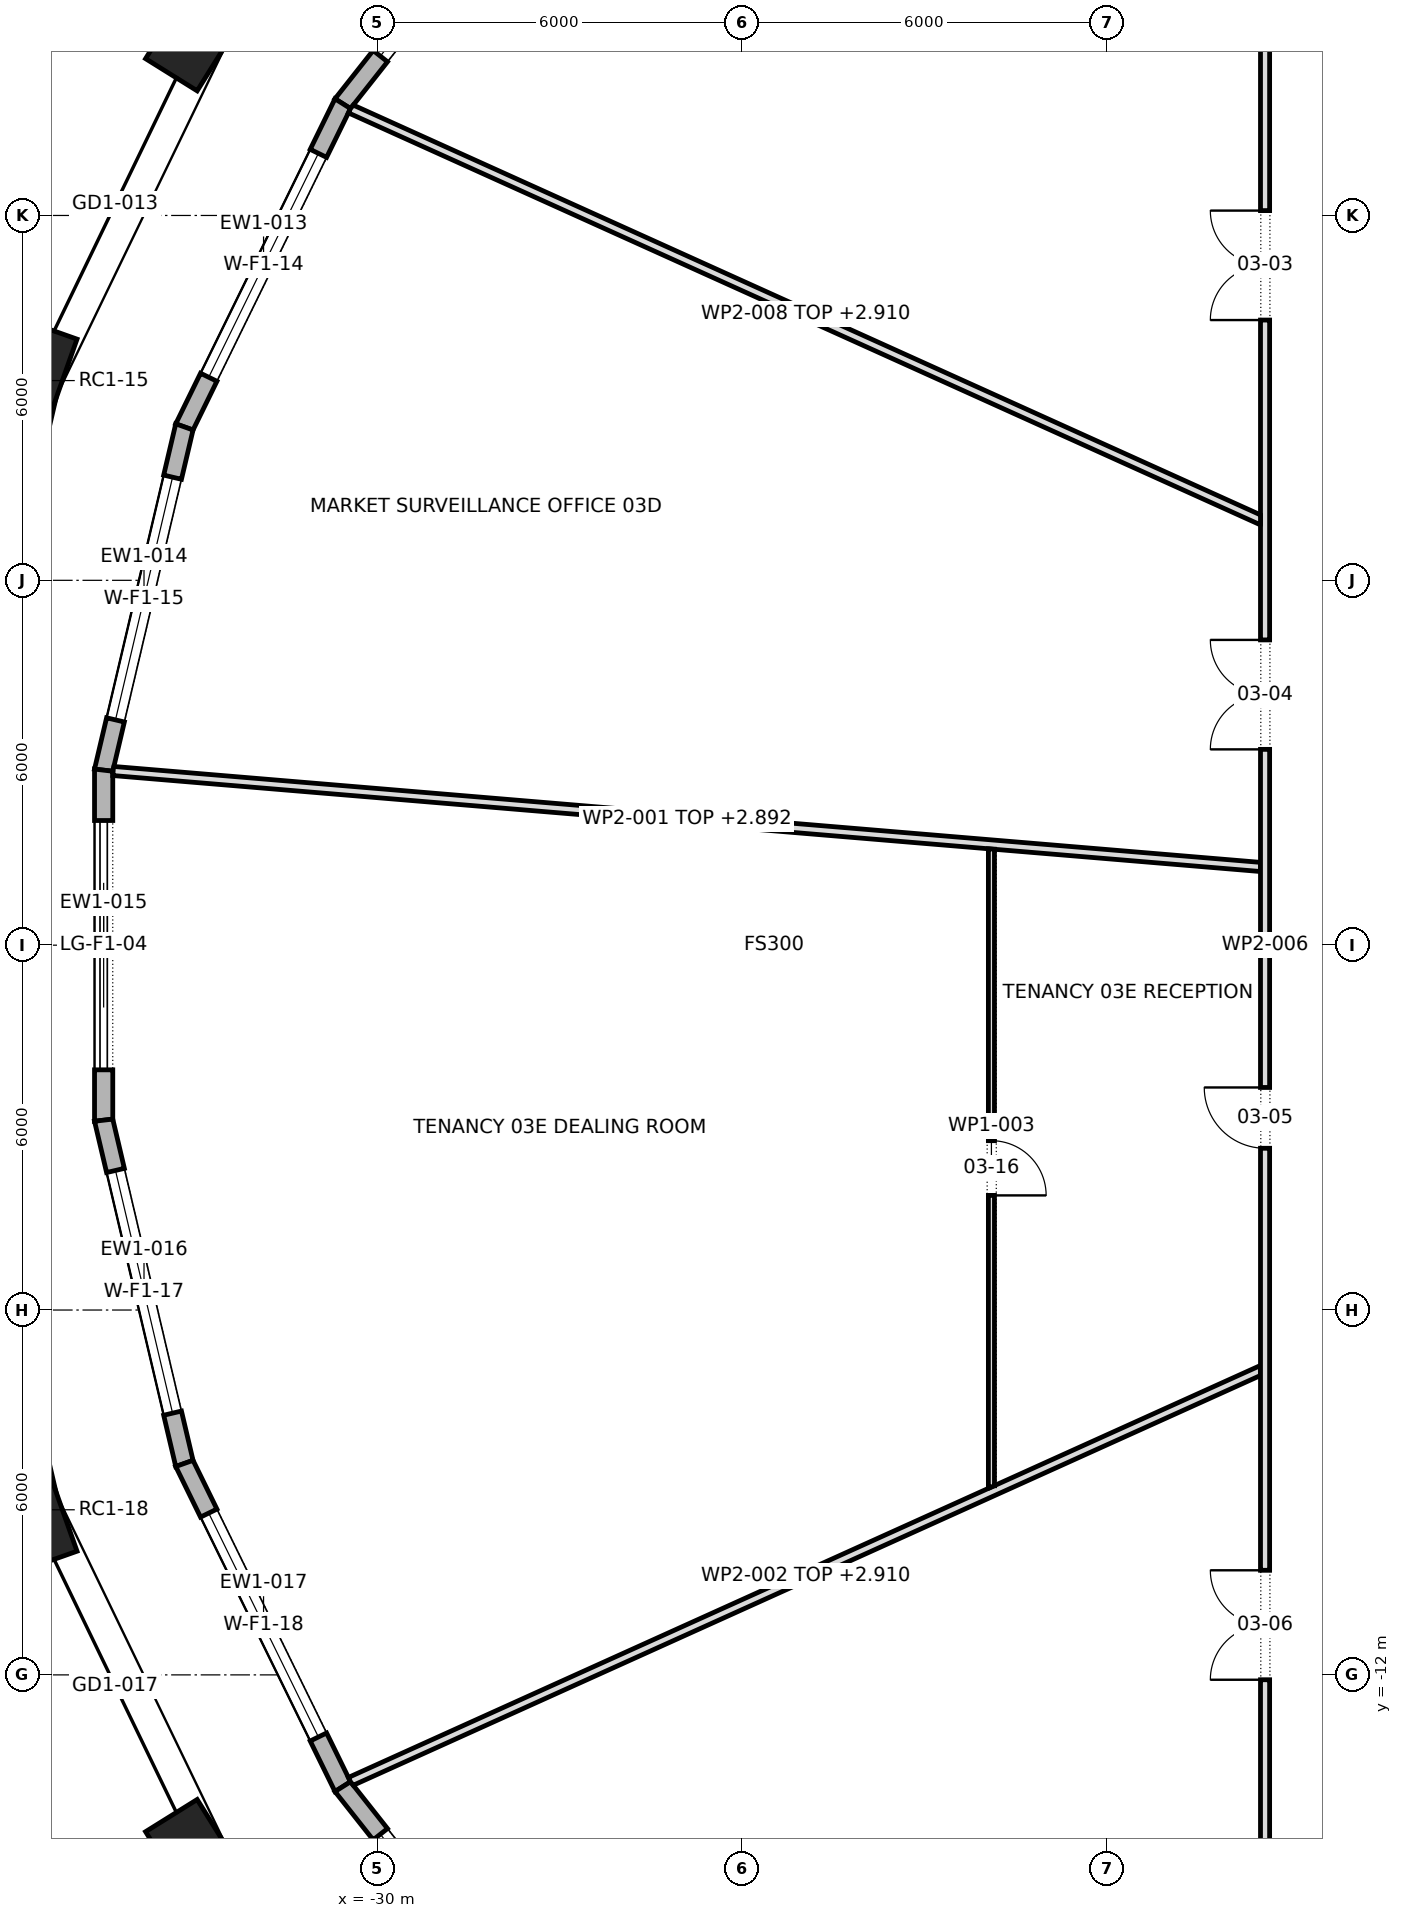
"""IFC4 building model, lengths in metres.
Left out: names, types, materials, properties, quantities, classifications, styles, units other than length and angle.
Written with IfcOpenShell. Run it as: python <this file> out.ifc"""

import sys

from ifc_helpers import new_model, si_unit, direction, frame, frame_2d, origin, origin_2d, place, context, subcontext, project, spatial, polyline, rectangle, outline, extrude, element, fill, save


model = new_model("IFC4")
c1 = context("Model", 3, precision=1e-05, world=origin(), true_north=direction((0.0, 1.0)))
c2 = subcontext(c1, "Body", "Model", "MODEL_VIEW")
j1 = project(units=[si_unit("LENGTHUNIT", "METRE"), si_unit("PLANEANGLEUNIT", "RADIAN")], contexts=[c1])
p1 = place(None, origin())
s1 = spatial("IfcSite", under=j1, at=p1, CompositionType="ELEMENT")
p2 = place(p1, origin())
s2 = spatial("IfcBuilding", under=s1, at=p2, CompositionType="ELEMENT")
p3 = place(p2, frame((0.0, 0.0, 48.7)))
s3 = spatial("IfcBuildingStorey", under=s2, at=p3, CompositionType="ELEMENT", Elevation=48.7)
for number, where, z_axis, x_axis in (
    (1, (-32.91, 15.078, 0.0), (0.0, 0.0, 1.0), (-0.529, -0.849, 0.0)),
    (2, (-35.709, 9.285, 0.0), (0.0, 0.0, 1.0), (-0.334, -0.943, 0.0)),
    (3, (-35.709, -9.285, 0.0), (0.0, 0.0, 1.0), (0.334, -0.943, 0.0)),
    (4, (-32.91, -15.078, 0.0), (0.0, 0.0, 1.0), (0.529, -0.849, 0.0)),
):
    element("IfcColumn", number, at=place(p3, frame(where, z_axis=z_axis, x_axis=x_axis)), inside=s3, PredefinedType="COLUMN", context=c2, shape_type="SweptSolid", body=[
        extrude(rectangle(XDim=1.8, YDim=1.0, at=origin_2d()), origin(), (0.0, 0.0, 1.0), 4.2),
    ])
p4 = place(p3, frame((-26.79, 18.62, 0.0), z_axis=(0.0, 0.0, 1.0), x_axis=(-0.619993638342, -0.78460683684, 0.0)))
e5 = element("IfcWall", 5, at=p4, inside=s3, PredefinedType="STANDARD", context=c2, shape_type="SweptSolid", body=[
    extrude(outline(polyline([(-0.015, -0.15), (6.11, -0.15), (6.078, 0.15), (0.015, 0.15), (-0.015, -0.15)])), origin(), (0.0, 0.0, 1.0), 3.9),
])
p5 = place(p4, frame((0.997, 0.0, 0.6)))
e6 = element("IfcOpeningElement", 6, at=p5, cuts=e5, PredefinedType="OPENING", context=c2, shape_type="SweptSolid", body=[
    extrude(rectangle(XDim=4.1, YDim=2.85, at=frame_2d((2.05, 1.425))), frame((0.0, 0.162, 0.0), z_axis=(0.0, -1.0, 0.0), x_axis=(1.0, 0.0, 0.0)), (0.0, 0.0, 1.0), 0.324),
])
p6 = place(p3, frame((-30.568, 13.838, 0.0), z_axis=(0.0, 0.0, 1.0), x_axis=(-0.439906146647, -0.898043752911, 0.0)))
e7 = element("IfcWall", 7, at=p6, inside=s3, PredefinedType="STANDARD", context=c2, shape_type="SweptSolid", body=[
    extrude(outline(polyline([(-0.016, -0.15), (5.936, -0.15), (5.902, 0.15), (0.016, 0.15), (-0.016, -0.15)])), origin(), (0.0, 0.0, 1.0), 3.9),
])
p7 = place(p6, frame((0.909, 0.0, 0.6)))
e8 = element("IfcOpeningElement", 8, at=p7, cuts=e7, PredefinedType="OPENING", context=c2, shape_type="SweptSolid", body=[
    extrude(rectangle(XDim=4.1, YDim=2.85, at=frame_2d((2.05, 1.425))), frame((0.0, 0.162, 0.0), z_axis=(0.0, -1.0, 0.0), x_axis=(1.0, 0.0, 0.0)), (0.0, 0.0, 1.0), 0.324),
])
p8 = place(p3, frame((-33.172, 8.523, 0.0), z_axis=(0.0, 0.0, 1.0), x_axis=(-0.228990053972, -0.973428762253, 0.0)))
e9 = element("IfcWall", 9, at=p8, inside=s3, PredefinedType="STANDARD", context=c2, shape_type="SweptSolid", body=[
    extrude(outline(polyline([(-0.017, -0.15), (5.816, -0.15), (5.781, 0.15), (0.017, 0.15), (-0.017, -0.15)])), origin(), (0.0, 0.0, 1.0), 3.9),
])
p9 = place(p8, frame((0.849, 0.0, 0.6)))
e10 = element("IfcOpeningElement", 10, at=p9, cuts=e9, PredefinedType="OPENING", context=c2, shape_type="SweptSolid", body=[
    extrude(rectangle(XDim=4.1, YDim=2.85, at=frame_2d((2.05, 1.425))), frame((0.0, 0.162, 0.0), z_axis=(0.0, -1.0, 0.0), x_axis=(1.0, 0.0, 0.0)), (0.0, 0.0, 1.0), 0.324),
])
p10 = place(p3, frame((-34.5, 2.878, 0.0), z_axis=(0.0, 0.0, 1.0), x_axis=(0.0, -1.0, 0.0)))
e11 = element("IfcWall", 11, at=p10, inside=s3, PredefinedType="STANDARD", context=c2, shape_type="SweptSolid", body=[
    extrude(outline(polyline([(-0.017, -0.15), (5.773, -0.15), (5.739, 0.15), (0.017, 0.15), (-0.017, -0.15)])), origin(), (0.0, 0.0, 1.0), 3.9),
])
p11 = place(p10, frame((0.828, 0.0, 0.0)))
e12 = element("IfcOpeningElement", 12, at=p11, cuts=e11, PredefinedType="OPENING", context=c2, shape_type="SweptSolid", body=[
    extrude(rectangle(XDim=4.1, YDim=3.45, at=frame_2d((2.05, 1.725))), frame((0.0, 0.162, 0.0), z_axis=(0.0, -1.0, 0.0), x_axis=(1.0, 0.0, 0.0)), (0.0, 0.0, 1.0), 0.324),
])
p12 = place(p3, frame((-34.5, -2.878, 0.0), z_axis=(0.0, 0.0, 1.0), x_axis=(0.228990053972, -0.973428762253, 0.0)))
e13 = element("IfcWall", 13, at=p12, inside=s3, PredefinedType="STANDARD", context=c2, shape_type="SweptSolid", body=[
    extrude(outline(polyline([(-0.017, -0.15), (5.816, -0.15), (5.782, 0.15), (0.017, 0.15), (-0.017, -0.15)])), origin(), (0.0, 0.0, 1.0), 3.9),
])
p13 = place(p12, frame((0.849, 0.0, 0.6)))
e14 = element("IfcOpeningElement", 14, at=p13, cuts=e13, PredefinedType="OPENING", context=c2, shape_type="SweptSolid", body=[
    extrude(rectangle(XDim=4.1, YDim=2.85, at=frame_2d((2.05, 1.425))), frame((0.0, 0.162, 0.0), z_axis=(0.0, -1.0, 0.0), x_axis=(1.0, 0.0, 0.0)), (0.0, 0.0, 1.0), 0.324),
])
p14 = place(p3, frame((-33.172, -8.523, 0.0), z_axis=(0.0, 0.0, 1.0), x_axis=(0.439906146647, -0.898043752911, 0.0)))
e15 = element("IfcWall", 15, at=p14, inside=s3, PredefinedType="STANDARD", context=c2, shape_type="SweptSolid", body=[
    extrude(outline(polyline([(-0.017, -0.15), (5.935, -0.15), (5.903, 0.15), (0.017, 0.15), (-0.017, -0.15)])), origin(), (0.0, 0.0, 1.0), 3.9),
])
p15 = place(p14, frame((0.909, 0.0, 0.6)))
e16 = element("IfcOpeningElement", 16, at=p15, cuts=e15, PredefinedType="OPENING", context=c2, shape_type="SweptSolid", body=[
    extrude(rectangle(XDim=4.1, YDim=2.85, at=frame_2d((2.05, 1.425))), frame((0.0, 0.162, 0.0), z_axis=(0.0, -1.0, 0.0), x_axis=(1.0, 0.0, 0.0)), (0.0, 0.0, 1.0), 0.324),
])
p16 = place(p3, frame((-30.568, -13.838, 0.0), z_axis=(0.0, 0.0, 1.0), x_axis=(0.619993638342, -0.78460683684, 0.0)))
e17 = element("IfcWall", 17, at=p16, inside=s3, PredefinedType="STANDARD", context=c2, shape_type="SweptSolid", body=[
    extrude(outline(polyline([(-0.016, -0.15), (6.109, -0.15), (6.079, 0.15), (0.016, 0.15), (-0.016, -0.15)])), origin(), (0.0, 0.0, 1.0), 3.9),
])
p17 = place(p16, frame((0.997, 0.0, 0.6)))
e18 = element("IfcOpeningElement", 18, at=p17, cuts=e17, PredefinedType="OPENING", context=c2, shape_type="SweptSolid", body=[
    extrude(rectangle(XDim=4.1, YDim=2.85, at=frame_2d((2.05, 1.425))), frame((0.0, 0.162, 0.0), z_axis=(0.0, -1.0, 0.0), x_axis=(1.0, 0.0, 0.0)), (0.0, 0.0, 1.0), 0.324),
])
p18 = place(p3, frame((-34.343, 2.865, 0.0), z_axis=(0.0, 0.0, 1.0), x_axis=(0.996520554602, -0.083347371018, 0.0)))
e19 = element("IfcWall", 19, at=p18, inside=s3, PredefinedType="PARTITIONING", context=c2, shape_type="SweptSolid", body=[
    extrude(outline(polyline([(0.0, -0.075), (1.818, -0.075), (3.636, -0.075), (5.455, -0.075), (7.273, -0.075), (9.091, -0.075), (10.909, -0.075), (12.727, -0.075), (14.545, -0.075), (14.55, -0.074), (14.55, -0.075), (16.013, -0.075), (17.477, -0.075), (18.94, -0.075), (18.928, 0.075), (17.035, 0.075), (15.143, 0.075), (13.251, 0.075), (11.359, 0.075), (9.467, 0.075), (7.574, 0.075), (5.682, 0.075), (3.79, 0.075), (1.898, 0.075), (0.006, 0.075), (0.0, 0.038), (0.0, -0.075)])), origin(), (0.0, 0.0, 1.0), 2.892),
])
p19 = place(p3, frame((-30.444, -13.755, 0.0), z_axis=(0.0, 0.0, 1.0), x_axis=(0.911343853748, 0.411645940385, 0.0)))
e20 = element("IfcWall", 20, at=p19, inside=s3, PredefinedType="PARTITIONING", context=c2, shape_type="SweptSolid", body=[
    extrude(outline(polyline([(0.02, -0.075), (1.839, -0.075), (3.658, -0.075), (5.477, -0.075), (7.296, -0.075), (9.115, -0.075), (10.934, -0.075), (12.753, -0.075), (14.572, -0.075), (16.391, -0.075), (16.442, 0.038), (16.442, 0.038), (16.458, 0.075), (14.858, 0.075), (13.258, 0.075), (11.658, 0.075), (11.657, 0.073), (11.653, 0.075), (9.711, 0.075), (7.769, 0.075), (5.826, 0.075), (3.884, 0.075), (1.942, 0.075), (0.0, 0.075), (0.0, 0.062), (0.002, -0.004), (0.02, -0.075)])), origin(), (0.0, 0.0, 1.0), 2.91),
])
p20 = place(p3, frame((-19.9, -8.933, 0.0), z_axis=(0.0, 0.0, 1.0), x_axis=(0.0, 1.0, 0.0)))
e21 = element("IfcWall", 21, at=p20, inside=s3, PredefinedType="PARTITIONING", context=c2, shape_type="SweptSolid", body=[
    extrude(outline(polyline([(0.045, -0.05), (1.789, -0.05), (3.533, -0.05), (5.277, -0.05), (7.021, -0.05), (8.765, -0.05), (10.51, -0.05), (10.518, 0.046), (10.518, 0.05), (8.765, 0.05), (7.012, 0.05), (5.259, 0.05), (3.506, 0.05), (1.753, 0.05), (0.0, 0.05), (0.0, 0.05), (0.045, -0.05)])), origin(), (0.0, 0.0, 1.0), 3.9),
])
p21 = place(p20, frame((4.817, 0.0, 0.0)))
e22 = element("IfcOpeningElement", 22, at=p21, cuts=e21, PredefinedType="OPENING", context=c2, shape_type="SweptSolid", body=[
    extrude(rectangle(XDim=0.9, YDim=2.1, at=frame_2d((0.45, 1.05))), frame((0.0, 0.062, 0.0), z_axis=(0.0, -1.0, 0.0), x_axis=(1.0, 0.0, 0.0)), (0.0, 0.0, 1.0), 0.124),
])
p22 = place(p3, frame((-15.4, -15.475, 0.0), z_axis=(0.0, 0.0, 1.0), x_axis=(0.0, 1.0, 0.0)))
e23 = element("IfcWall", 23, at=p22, inside=s3, PredefinedType="PARTITIONING", context=c2, shape_type="SweptSolid", body=[
    extrude(outline(polyline([(0.15, -0.075), (2.066, -0.075), (3.981, -0.075), (5.897, -0.075), (7.812, -0.075), (9.728, -0.075), (11.644, -0.075), (13.56, -0.075), (15.475, -0.075), (17.391, -0.075), (19.306, -0.075), (21.222, -0.075), (23.138, -0.075), (25.053, -0.075), (26.969, -0.075), (28.885, -0.075), (30.8, -0.075), (30.95, 0.075), (29.016, 0.075), (27.081, 0.075), (25.147, 0.075), (23.212, 0.075), (21.278, 0.075), (19.344, 0.075), (17.409, 0.075), (15.475, 0.075), (13.541, 0.075), (11.606, 0.075), (9.672, 0.075), (7.738, 0.075), (5.803, 0.075), (3.869, 0.075), (1.935, 0.075), (0.0, 0.075), (0.15, -0.075)])), origin(), (0.0, 0.0, 1.0), 3.9),
])
p23 = place(p22, frame((25.755, 0.0, 0.0)))
e24 = element("IfcOpeningElement", 24, at=p23, cuts=e23, PredefinedType="OPENING", context=c2, shape_type="SweptSolid", body=[
    extrude(rectangle(XDim=1.8, YDim=2.1, at=frame_2d((0.9, 1.05))), frame((0.0, 0.087, 0.0), z_axis=(0.0, -1.0, 0.0), x_axis=(1.0, 0.0, 0.0)), (0.0, 0.0, 1.0), 0.174),
])
p24 = place(p22, frame((18.695, 0.0, 0.0)))
e25 = element("IfcOpeningElement", 25, at=p24, cuts=e23, PredefinedType="OPENING", context=c2, shape_type="SweptSolid", body=[
    extrude(rectangle(XDim=1.8, YDim=2.1, at=frame_2d((0.9, 1.05))), frame((0.0, 0.087, 0.0), z_axis=(0.0, -1.0, 0.0), x_axis=(1.0, 0.0, 0.0)), (0.0, 0.0, 1.0), 0.174),
])
p25 = place(p22, frame((12.135, 0.0, 0.0)))
e26 = element("IfcOpeningElement", 26, at=p25, cuts=e23, PredefinedType="OPENING", context=c2, shape_type="SweptSolid", body=[
    extrude(rectangle(XDim=1.0, YDim=2.1, at=frame_2d((0.5, 1.05))), frame((0.0, 0.087, 0.0), z_axis=(0.0, -1.0, 0.0), x_axis=(1.0, 0.0, 0.0)), (0.0, 0.0, 1.0), 0.174),
])
p26 = place(p22, frame((3.395, 0.0, 0.0)))
e27 = element("IfcOpeningElement", 27, at=p26, cuts=e23, PredefinedType="OPENING", context=c2, shape_type="SweptSolid", body=[
    extrude(rectangle(XDim=1.8, YDim=2.1, at=frame_2d((0.9, 1.05))), frame((0.0, 0.087, 0.0), z_axis=(0.0, -1.0, 0.0), x_axis=(1.0, 0.0, 0.0)), (0.0, 0.0, 1.0), 0.174),
])
p27 = place(p3, frame((-15.444, 6.98, 0.0), z_axis=(0.0, 0.0, 1.0), x_axis=(-0.911343853748, 0.411645940385, 0.0)))
e28 = element("IfcWall", 28, at=p27, inside=s3, PredefinedType="PARTITIONING", context=c2, shape_type="SweptSolid", body=[
    extrude(outline(polyline([(0.068, -0.075), (1.887, -0.075), (3.706, -0.075), (5.525, -0.075), (7.344, -0.075), (9.163, -0.075), (10.982, -0.075), (12.801, -0.075), (14.62, -0.075), (16.439, -0.075), (16.457, -0.004), (16.459, 0.064), (16.459, 0.075), (14.63, 0.075), (12.801, 0.075), (10.972, 0.075), (9.144, 0.075), (7.315, 0.075), (5.486, 0.075), (3.657, 0.075), (1.829, 0.075), (0.0, 0.075), (0.068, -0.075)])), origin(), (0.0, 0.0, 1.0), 2.91),
])
p28 = place(p5, origin())
e29 = element("IfcWindow", 29, at=p28, inside=s3, PartitioningType="TRIPLE_PANEL_VERTICAL", PredefinedType="WINDOW", context=c2, shape_type="SweptSolid", body=[
    extrude(rectangle(XDim=4.1, YDim=2.85, at=frame_2d((2.05, 1.425))), frame((0.0, 0.03, 0.0), z_axis=(0.0, -1.0, 0.0), x_axis=(1.0, 0.0, 0.0)), (0.0, 0.0, 1.0), 0.06),
])
fill(e6, e29)
p29 = place(p7, origin())
e30 = element("IfcWindow", 30, at=p29, inside=s3, PartitioningType="TRIPLE_PANEL_VERTICAL", PredefinedType="WINDOW", context=c2, shape_type="SweptSolid", body=[
    extrude(rectangle(XDim=4.1, YDim=2.85, at=frame_2d((2.05, 1.425))), frame((0.0, 0.03, 0.0), z_axis=(0.0, -1.0, 0.0), x_axis=(1.0, 0.0, 0.0)), (0.0, 0.0, 1.0), 0.06),
])
fill(e8, e30)
p30 = place(p9, origin())
e31 = element("IfcWindow", 31, at=p30, inside=s3, PartitioningType="TRIPLE_PANEL_VERTICAL", PredefinedType="WINDOW", context=c2, shape_type="SweptSolid", body=[
    extrude(rectangle(XDim=4.1, YDim=2.85, at=frame_2d((2.05, 1.425))), frame((0.0, 0.03, 0.0), z_axis=(0.0, -1.0, 0.0), x_axis=(1.0, 0.0, 0.0)), (0.0, 0.0, 1.0), 0.06),
])
fill(e10, e31)
p31 = place(p11, origin())
e32 = element("IfcDoor", 32, at=p31, inside=s3, OperationType="DOUBLE_DOOR_SLIDING", PredefinedType="DOOR", context=c2, shape_type="SweptSolid", body=[
    extrude(rectangle(XDim=4.1, YDim=3.45, at=frame_2d((2.05, 1.725))), frame((0.0, 0.025, 0.0), z_axis=(0.0, -1.0, 0.0), x_axis=(1.0, 0.0, 0.0)), (0.0, 0.0, 1.0), 0.05),
])
fill(e12, e32)
p32 = place(p13, origin())
e33 = element("IfcWindow", 33, at=p32, inside=s3, PartitioningType="TRIPLE_PANEL_VERTICAL", PredefinedType="WINDOW", context=c2, shape_type="SweptSolid", body=[
    extrude(rectangle(XDim=4.1, YDim=2.85, at=frame_2d((2.05, 1.425))), frame((0.0, 0.03, 0.0), z_axis=(0.0, -1.0, 0.0), x_axis=(1.0, 0.0, 0.0)), (0.0, 0.0, 1.0), 0.06),
])
fill(e14, e33)
p33 = place(p15, origin())
e34 = element("IfcWindow", 34, at=p33, inside=s3, PartitioningType="TRIPLE_PANEL_VERTICAL", PredefinedType="WINDOW", context=c2, shape_type="SweptSolid", body=[
    extrude(rectangle(XDim=4.1, YDim=2.85, at=frame_2d((2.05, 1.425))), frame((0.0, 0.03, 0.0), z_axis=(0.0, -1.0, 0.0), x_axis=(1.0, 0.0, 0.0)), (0.0, 0.0, 1.0), 0.06),
])
fill(e16, e34)
p34 = place(p17, origin())
e35 = element("IfcWindow", 35, at=p34, inside=s3, PartitioningType="TRIPLE_PANEL_VERTICAL", PredefinedType="WINDOW", context=c2, shape_type="SweptSolid", body=[
    extrude(rectangle(XDim=4.1, YDim=2.85, at=frame_2d((2.05, 1.425))), frame((0.0, 0.03, 0.0), z_axis=(0.0, -1.0, 0.0), x_axis=(1.0, 0.0, 0.0)), (0.0, 0.0, 1.0), 0.06),
])
fill(e18, e35)
p35 = place(p23, origin())
e36 = element("IfcDoor", 36, at=p35, inside=s3, OperationType="DOUBLE_DOOR_SINGLE_SWING", PredefinedType="DOOR", context=c2, shape_type="SweptSolid", body=[
    extrude(rectangle(XDim=1.8, YDim=2.1, at=frame_2d((0.9, 1.05))), frame((0.0, 0.025, 0.0), z_axis=(0.0, -1.0, 0.0), x_axis=(1.0, 0.0, 0.0)), (0.0, 0.0, 1.0), 0.05),
])
fill(e24, e36)
p36 = place(p24, origin())
e37 = element("IfcDoor", 37, at=p36, inside=s3, OperationType="DOUBLE_DOOR_SINGLE_SWING", PredefinedType="DOOR", context=c2, shape_type="SweptSolid", body=[
    extrude(rectangle(XDim=1.8, YDim=2.1, at=frame_2d((0.9, 1.05))), frame((0.0, 0.025, 0.0), z_axis=(0.0, -1.0, 0.0), x_axis=(1.0, 0.0, 0.0)), (0.0, 0.0, 1.0), 0.05),
])
fill(e25, e37)
p37 = place(p25, origin())
e38 = element("IfcDoor", 38, at=p37, inside=s3, OperationType="SINGLE_SWING_LEFT", PredefinedType="DOOR", context=c2, shape_type="SweptSolid", body=[
    extrude(rectangle(XDim=1.0, YDim=2.1, at=frame_2d((0.5, 1.05))), frame((0.0, 0.025, 0.0), z_axis=(0.0, -1.0, 0.0), x_axis=(1.0, 0.0, 0.0)), (0.0, 0.0, 1.0), 0.05),
])
fill(e26, e38)
p38 = place(p26, origin())
e39 = element("IfcDoor", 39, at=p38, inside=s3, OperationType="DOUBLE_DOOR_SINGLE_SWING", PredefinedType="DOOR", context=c2, shape_type="SweptSolid", body=[
    extrude(rectangle(XDim=1.8, YDim=2.1, at=frame_2d((0.9, 1.05))), frame((0.0, 0.025, 0.0), z_axis=(0.0, -1.0, 0.0), x_axis=(1.0, 0.0, 0.0)), (0.0, 0.0, 1.0), 0.05),
])
fill(e27, e39)
p39 = place(p21, frame((0.9, 0.0, 0.0), z_axis=(0.0, 0.0, 1.0), x_axis=(-1.0, 0.0, 0.0)))
e40 = element("IfcDoor", 40, at=p39, inside=s3, OperationType="SINGLE_SWING_LEFT", PredefinedType="DOOR", context=c2, shape_type="SweptSolid", body=[
    extrude(rectangle(XDim=0.9, YDim=2.1, at=frame_2d((0.45, 1.05))), frame((0.0, 0.025, 0.0), z_axis=(0.0, -1.0, 0.0), x_axis=(1.0, 0.0, 0.0)), (0.0, 0.0, 1.0), 0.05),
])
fill(e22, e40)
save(model, sys.argv[1])
